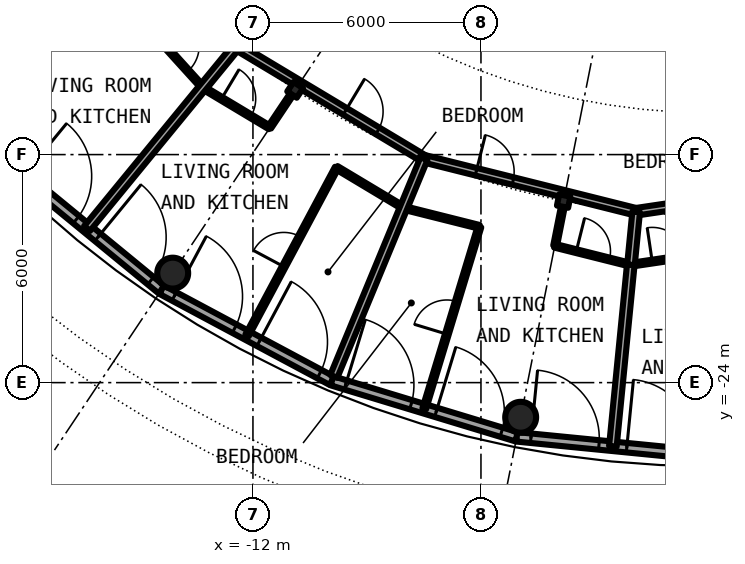
"""IFC4 building model, lengths in metres.
Left out: names, types, materials, properties, quantities, classifications, styles, units other than length and angle.
Written with IfcOpenShell. Run it as: python <this file> out.ifc"""

import sys

from ifc_helpers import new_model, si_unit, direction, frame, frame_2d, origin, origin_2d, place, context, subcontext, project, spatial, rectangle, hollow_circle, i_section, extrude, element, fill, save


model = new_model("IFC4")
c1 = context("Model", 3, precision=1e-05, world=origin(), true_north=direction((0.0, 1.0)))
c2 = subcontext(c1, "Body", "Model", "MODEL_VIEW")
j1 = project(units=[si_unit("LENGTHUNIT", "METRE"), si_unit("PLANEANGLEUNIT", "RADIAN")], contexts=[c1])
p1 = place(None, origin())
s1 = spatial("IfcSite", under=j1, at=p1, CompositionType="ELEMENT")
p2 = place(p1, origin())
s2 = spatial("IfcBuilding", under=s1, at=p2, CompositionType="ELEMENT")
p3 = place(p2, frame((0.0, 0.0, 237.1)))
s3 = spatial("IfcBuildingStorey", under=s2, at=p3, CompositionType="ELEMENT", Elevation=237.1)
for number, where, z_axis, x_axis in (
    (1, (-14.112, -21.119, 0.0), (0.0, 0.0, 1.0), (1.0, 0.0, 0.0)),
    (2, (-4.955, -24.912, 0.0), (0.0, 0.0, 1.0), (1.0, 0.0, 0.0)),
):
    element("IfcColumn", number, at=place(p3, frame(where, z_axis=z_axis, x_axis=x_axis)), inside=s3, PredefinedType="COLUMN", context=c2, shape_type="SweptSolid", body=[
        extrude(hollow_circle(Radius=0.406, WallThickness=0.03, at=origin_2d()), origin(), (0.0, 0.0, 1.0), 3.05),
    ])
for number, where, z_axis, x_axis in (
    (3, (-10.889, -16.297, 0.0), (0.0, 0.0, 1.0), (-0.556, -0.831, 0.0)),
    (4, (-3.824, -19.223, 0.0), (0.0, 0.0, 1.0), (-0.195, -0.981, 0.0)),
):
    element("IfcColumn", number, at=place(p3, frame(where, z_axis=z_axis, x_axis=x_axis)), inside=s3, PredefinedType="COLUMN", context=c2, shape_type="SweptSolid", body=[
        extrude(i_section(OverallWidth=0.3, OverallDepth=0.3, WebThickness=0.011, FlangeThickness=0.019, FilletRadius=0.027, at=origin_2d()), origin(), (0.0, 0.0, 1.0), 3.05),
    ])
p4 = place(p3, frame((-18.332, -18.332, 0.0), z_axis=(0.0, 0.0, 1.0), x_axis=(0.77306189429, -0.63433059803, 0.0)))
e5 = element("IfcWall", 5, at=p4, inside=s3, PredefinedType="SOLIDWALL", context=c2, shape_type="SweptSolid", body=[
    extrude(rectangle(XDim=5.082, YDim=0.25, at=frame_2d((2.541, 0.0))), origin(), (0.0, 0.0, 1.0), 2.7),
])
p5 = place(p4, frame((0.374, 0.0, 0.0)))
e6 = element("IfcOpeningElement", 6, at=p5, cuts=e5, PredefinedType="OPENING", context=c2, shape_type="SweptSolid", body=[
    extrude(rectangle(XDim=1.8, YDim=2.2, at=frame_2d((0.9, 1.1))), frame((0.0, 0.135, 0.0), z_axis=(0.0, -1.0, 0.0), x_axis=(1.0, 0.0, 0.0)), (0.0, 0.0, 1.0), 0.27),
])
p6 = place(p4, frame((2.909, 0.0, 0.0)))
e7 = element("IfcOpeningElement", 7, at=p6, cuts=e5, PredefinedType="OPENING", context=c2, shape_type="SweptSolid", body=[
    extrude(rectangle(XDim=1.8, YDim=2.2, at=frame_2d((0.9, 1.1))), frame((0.0, 0.135, 0.0), z_axis=(0.0, -1.0, 0.0), x_axis=(1.0, 0.0, 0.0)), (0.0, 0.0, 1.0), 0.27),
])
p7 = place(p3, frame((-14.403, -21.556, 0.0), z_axis=(0.0, 0.0, 1.0), x_axis=(0.881903089468, -0.47143073806, 0.0)))
e8 = element("IfcWall", 8, at=p7, inside=s3, PredefinedType="SOLIDWALL", context=c2, shape_type="SweptSolid", body=[
    extrude(rectangle(XDim=5.082, YDim=0.25, at=frame_2d((2.541, 0.0))), origin(), (0.0, 0.0, 1.0), 2.7),
])
p8 = place(p7, frame((0.374, 0.0, 0.0)))
e9 = element("IfcOpeningElement", 9, at=p8, cuts=e8, PredefinedType="OPENING", context=c2, shape_type="SweptSolid", body=[
    extrude(rectangle(XDim=1.8, YDim=2.2, at=frame_2d((0.9, 1.1))), frame((0.0, 0.135, 0.0), z_axis=(0.0, -1.0, 0.0), x_axis=(1.0, 0.0, 0.0)), (0.0, 0.0, 1.0), 0.27),
])
p9 = place(p7, frame((2.909, 0.0, 0.0)))
e10 = element("IfcOpeningElement", 10, at=p9, cuts=e8, PredefinedType="OPENING", context=c2, shape_type="SweptSolid", body=[
    extrude(rectangle(XDim=1.8, YDim=2.2, at=frame_2d((0.9, 1.1))), frame((0.0, 0.135, 0.0), z_axis=(0.0, -1.0, 0.0), x_axis=(1.0, 0.0, 0.0)), (0.0, 0.0, 1.0), 0.27),
])
p10 = place(p3, frame((-9.921, -23.952, 0.0), z_axis=(0.0, 0.0, 1.0), x_axis=(0.956941126395, -0.290282070774, 0.0)))
e11 = element("IfcWall", 11, at=p10, inside=s3, PredefinedType="SOLIDWALL", context=c2, shape_type="SweptSolid", body=[
    extrude(rectangle(XDim=5.082, YDim=0.25, at=frame_2d((2.541, 0.0))), origin(), (0.0, 0.0, 1.0), 2.7),
])
p11 = place(p10, frame((0.374, 0.0, 0.0)))
e12 = element("IfcOpeningElement", 12, at=p11, cuts=e11, PredefinedType="OPENING", context=c2, shape_type="SweptSolid", body=[
    extrude(rectangle(XDim=1.8, YDim=2.2, at=frame_2d((0.9, 1.1))), frame((0.0, 0.135, 0.0), z_axis=(0.0, -1.0, 0.0), x_axis=(1.0, 0.0, 0.0)), (0.0, 0.0, 1.0), 0.27),
])
p12 = place(p10, frame((2.861, 0.0, 0.0)))
e13 = element("IfcOpeningElement", 13, at=p12, cuts=e11, PredefinedType="OPENING", context=c2, shape_type="SweptSolid", body=[
    extrude(rectangle(XDim=1.8, YDim=2.2, at=frame_2d((0.9, 1.1))), frame((0.0, 0.135, 0.0), z_axis=(0.0, -1.0, 0.0), x_axis=(1.0, 0.0, 0.0)), (0.0, 0.0, 1.0), 0.27),
])
p13 = place(p3, frame((-5.058, -25.427, 0.0), z_axis=(0.0, 0.0, 1.0), x_axis=(0.995187279479, -0.097991217788, 0.0)))
e14 = element("IfcWall", 14, at=p13, inside=s3, PredefinedType="SOLIDWALL", context=c2, shape_type="SweptSolid", body=[
    extrude(rectangle(XDim=5.083, YDim=0.25, at=frame_2d((2.541, 0.0))), origin(), (0.0, 0.0, 1.0), 2.7),
])
p14 = place(p13, frame((0.374, 0.0, 0.0)))
e15 = element("IfcOpeningElement", 15, at=p14, cuts=e14, PredefinedType="OPENING", context=c2, shape_type="SweptSolid", body=[
    extrude(rectangle(XDim=1.8, YDim=2.2, at=frame_2d((0.9, 1.1))), frame((0.0, 0.135, 0.0), z_axis=(0.0, -1.0, 0.0), x_axis=(1.0, 0.0, 0.0)), (0.0, 0.0, 1.0), 0.27),
])
p15 = place(p13, frame((2.909, 0.0, 0.0)))
e16 = element("IfcOpeningElement", 16, at=p15, cuts=e14, PredefinedType="OPENING", context=c2, shape_type="SweptSolid", body=[
    extrude(rectangle(XDim=1.8, YDim=2.2, at=frame_2d((0.9, 1.1))), frame((0.0, 0.135, 0.0), z_axis=(0.0, -1.0, 0.0), x_axis=(1.0, 0.0, 0.0)), (0.0, 0.0, 1.0), 0.27),
])
p16 = place(p3, frame((-14.702, -14.711, 0.0), z_axis=(0.0, 0.0, 1.0), x_axis=(0.671678456097, -0.74084279818, 0.0)))
e17 = element("IfcWall", 17, at=p16, inside=s3, PredefinedType="PARTITIONING", context=c2, shape_type="SweptSolid", body=[
    extrude(rectangle(XDim=2.054, YDim=0.1, at=frame_2d((1.027, 0.0))), origin(), (0.0, 0.0, 1.0), 2.7),
])
p17 = place(p16, frame((0.577, 0.0, 0.0)))
e18 = element("IfcOpeningElement", 18, at=p17, cuts=e17, PredefinedType="OPENING", context=c2, shape_type="SweptSolid", body=[
    extrude(rectangle(XDim=0.9, YDim=2.3, at=frame_2d((0.45, 1.15))), frame((0.0, 0.06, 0.0), z_axis=(0.0, -1.0, 0.0), x_axis=(1.0, 0.0, 0.0)), (0.0, 0.0, 1.0), 0.12),
])
p18 = place(p3, frame((-13.322, -16.233, 0.0), z_axis=(0.0, 0.0, 1.0), x_axis=(0.857713062192, -0.514128683254, 0.0)))
e19 = element("IfcWall", 19, at=p18, inside=s3, PredefinedType="PARTITIONING", context=c2, shape_type="SweptSolid", body=[
    extrude(rectangle(XDim=2.054, YDim=0.1, at=frame_2d((1.027, 0.0))), origin(), (0.0, 0.0, 1.0), 2.7),
])
p19 = place(p18, frame((0.577, 0.0, 0.0)))
e20 = element("IfcOpeningElement", 20, at=p19, cuts=e19, PredefinedType="OPENING", context=c2, shape_type="SweptSolid", body=[
    extrude(rectangle(XDim=0.9, YDim=2.3, at=frame_2d((0.45, 1.15))), frame((0.0, 0.06, 0.0), z_axis=(0.0, -1.0, 0.0), x_axis=(1.0, 0.0, 0.0)), (0.0, 0.0, 1.0), 0.12),
])
p20 = place(p3, frame((-9.798, -18.345, 0.0), z_axis=(0.0, 0.0, 1.0), x_axis=(0.857796869978, -0.513988842152, 0.0)))
e21 = element("IfcWall", 21, at=p20, inside=s3, PredefinedType="PARTITIONING", context=c2, shape_type="SweptSolid", body=[
    extrude(rectangle(XDim=2.054, YDim=0.1, at=frame_2d((1.027, 0.0))), origin(), (0.0, 0.0, 1.0), 2.7),
])
p21 = place(p3, frame((-8.036, -19.401, 0.0), z_axis=(0.0, 0.0, 1.0), x_axis=(0.96991130126, -0.243458554355, 0.0)))
e22 = element("IfcWall", 22, at=p21, inside=s3, PredefinedType="PARTITIONING", context=c2, shape_type="SweptSolid", body=[
    extrude(rectangle(XDim=2.054, YDim=0.1, at=frame_2d((1.027, 0.0))), origin(), (0.0, 0.0, 1.0), 2.7),
])
p22 = place(p3, frame((-4.063, -20.398, 0.0), z_axis=(0.0, 0.0, 1.0), x_axis=(0.969939465938, -0.24334632197, 0.0)))
e23 = element("IfcWall", 23, at=p22, inside=s3, PredefinedType="PARTITIONING", context=c2, shape_type="SweptSolid", body=[
    extrude(rectangle(XDim=2.055, YDim=0.1, at=frame_2d((1.027, 0.0))), origin(), (0.0, 0.0, 1.0), 2.7),
])
p23 = place(p22, frame((0.589, 0.0, 0.0)))
e24 = element("IfcOpeningElement", 24, at=p23, cuts=e23, PredefinedType="OPENING", context=c2, shape_type="SweptSolid", body=[
    extrude(rectangle(XDim=0.9, YDim=2.3, at=frame_2d((0.45, 1.15))), frame((0.0, 0.06, 0.0), z_axis=(0.0, -1.0, 0.0), x_axis=(1.0, 0.0, 0.0)), (0.0, 0.0, 1.0), 0.12),
])
p24 = place(p3, frame((-2.061, -20.9, 0.0), z_axis=(0.0, 0.0, 1.0), x_axis=(0.989154601185, 0.146878095557, 0.0)))
e25 = element("IfcWall", 25, at=p24, inside=s3, PredefinedType="PARTITIONING", context=c2, shape_type="SweptSolid", body=[
    extrude(rectangle(XDim=2.041, YDim=0.1, at=frame_2d((1.021, 0.0))), origin(), (0.0, 0.0, 1.0), 2.7),
])
p25 = place(p24, frame((0.574, 0.0, 0.0)))
e26 = element("IfcOpeningElement", 26, at=p25, cuts=e25, PredefinedType="OPENING", context=c2, shape_type="SweptSolid", body=[
    extrude(rectangle(XDim=0.9, YDim=2.3, at=frame_2d((0.45, 1.15))), frame((0.0, 0.06, 0.0), z_axis=(0.0, -1.0, 0.0), x_axis=(1.0, 0.0, 0.0)), (0.0, 0.0, 1.0), 0.12),
])
p26 = place(p3, frame((-12.434, -15.151, 0.0), z_axis=(0.0, 0.0, 1.0), x_axis=(0.857710084627, -0.514133650648, 0.0)))
e27 = element("IfcWall", 27, at=p26, inside=s3, PredefinedType="PARTITIONING", context=c2, shape_type="SweptSolid", body=[
    extrude(rectangle(XDim=5.751, YDim=0.2, at=frame_2d((2.876, 0.0))), origin(), (0.0, 0.0, 1.0), 2.45),
])
p27 = place(p26, frame((3.333, 0.0, 0.0)))
e28 = element("IfcOpeningElement", 28, at=p27, cuts=e27, PredefinedType="OPENING", context=c2, shape_type="SweptSolid", body=[
    extrude(rectangle(XDim=1.0, YDim=2.3, at=frame_2d((0.5, 1.15))), frame((0.0, 0.11, 0.0), z_axis=(0.0, -1.0, 0.0), x_axis=(1.0, 0.0, 0.0)), (0.0, 0.0, 1.0), 0.22),
])
p28 = place(p3, frame((-7.501, -18.108, 0.0), z_axis=(0.0, 0.0, 1.0), x_axis=(0.970012544183, -0.243054858266, 0.0)))
e29 = element("IfcWall", 29, at=p28, inside=s3, PredefinedType="PARTITIONING", context=c2, shape_type="SweptSolid", body=[
    extrude(rectangle(XDim=5.753, YDim=0.2, at=frame_2d((2.876, 0.0))), origin(), (0.0, 0.0, 1.0), 2.45),
])
p29 = place(p28, frame((1.417, 0.0, 0.0)))
e30 = element("IfcOpeningElement", 30, at=p29, cuts=e29, PredefinedType="OPENING", context=c2, shape_type="SweptSolid", body=[
    extrude(rectangle(XDim=1.0, YDim=2.3, at=frame_2d((0.5, 1.15))), frame((0.0, 0.11, 0.0), z_axis=(0.0, -1.0, 0.0), x_axis=(1.0, 0.0, 0.0)), (0.0, 0.0, 1.0), 0.22),
])
p30 = place(p3, frame((-1.927, -19.506, 0.0), z_axis=(0.0, 0.0, 1.0), x_axis=(0.989181308547, 0.146698121399, 0.0)))
e31 = element("IfcWall", 31, at=p30, inside=s3, PredefinedType="PARTITIONING", context=c2, shape_type="SweptSolid", body=[
    extrude(rectangle(XDim=9.531, YDim=0.2, at=frame_2d((4.766, 0.0))), origin(), (0.0, 0.0, 1.0), 2.45),
])
p31 = place(p30, frame((5.811, 0.0, 0.0)))
e32 = element("IfcOpeningElement", 32, at=p31, cuts=e31, PredefinedType="OPENING", context=c2, shape_type="SweptSolid", body=[
    extrude(rectangle(XDim=1.0, YDim=2.3, at=frame_2d((0.5, 1.15))), frame((0.0, 0.11, 0.0), z_axis=(0.0, -1.0, 0.0), x_axis=(1.0, 0.0, 0.0)), (0.0, 0.0, 1.0), 0.22),
])
p32 = place(p3, frame((-19.949, -16.361, 0.0), z_axis=(0.0, 0.0, 1.0), x_axis=(0.773226150619, 0.634130365145, 0.0)))
e33 = element("IfcWall", 33, at=p32, inside=s3, PredefinedType="PARTITIONING", context=c2, shape_type="SweptSolid", body=[
    extrude(rectangle(XDim=5.002, YDim=0.1, at=frame_2d((2.501, 0.0))), origin(), (0.0, 0.0, 1.0), 2.7),
])
p33 = place(p32, frame((2.051, 0.0, 0.0)))
e34 = element("IfcOpeningElement", 34, at=p33, cuts=e33, PredefinedType="OPENING", context=c2, shape_type="SweptSolid", body=[
    extrude(rectangle(XDim=0.9, YDim=2.3, at=frame_2d((0.45, 1.15))), frame((0.0, 0.06, 0.0), z_axis=(0.0, -1.0, 0.0), x_axis=(1.0, 0.0, 0.0)), (0.0, 0.0, 1.0), 0.12),
])
p34 = place(p3, frame((-16.366, -19.945, 0.0), z_axis=(0.0, 0.0, 1.0), x_axis=(0.634332904094, 0.773060002059, 0.0)))
e35 = element("IfcWall", 35, at=p34, inside=s3, PredefinedType="PARTITIONING", context=c2, shape_type="SweptSolid", body=[
    extrude(rectangle(XDim=6.2, YDim=0.2, at=frame_2d((3.1, 0.0))), origin(), (0.0, 0.0, 1.0), 2.7),
])
p35 = place(p3, frame((-12.155, -22.757, 0.0), z_axis=(0.0, 0.0, 1.0), x_axis=(0.4711809038, 0.882036595553, 0.0)))
e36 = element("IfcWall", 36, at=p35, inside=s3, PredefinedType="PARTITIONING", context=c2, shape_type="SweptSolid", body=[
    extrude(rectangle(XDim=5.002, YDim=0.1, at=frame_2d((2.501, 0.0))), origin(), (0.0, 0.0, 1.0), 2.7),
])
p36 = place(p35, frame((2.051, 0.0, 0.0)))
e37 = element("IfcOpeningElement", 37, at=p36, cuts=e36, PredefinedType="OPENING", context=c2, shape_type="SweptSolid", body=[
    extrude(rectangle(XDim=0.9, YDim=2.3, at=frame_2d((0.45, 1.15))), frame((0.0, 0.06, 0.0), z_axis=(0.0, -1.0, 0.0), x_axis=(1.0, 0.0, 0.0)), (0.0, 0.0, 1.0), 0.12),
])
p37 = place(p3, frame((-11.565, -17.286, 0.0), z_axis=(0.0, 0.0, 1.0), x_axis=(0.556311964259, 0.830973524502, 0.0)))
e38 = element("IfcWall", 38, at=p37, inside=s3, PredefinedType="PARTITIONING", context=c2, shape_type="SweptSolid", body=[
    extrude(rectangle(XDim=1.048, YDim=0.1, at=frame_2d((0.524, 0.0))), origin(), (0.0, 0.0, 1.0), 2.7),
])
p38 = place(p3, frame((-9.873, -23.836, 0.0), z_axis=(0.0, 0.0, 1.0), x_axis=(0.382606842458, 0.92391125337, 0.0)))
e39 = element("IfcWall", 39, at=p38, inside=s3, PredefinedType="PARTITIONING", context=c2, shape_type="SweptSolid", body=[
    extrude(rectangle(XDim=6.2, YDim=0.2, at=frame_2d((3.1, 0.0))), origin(), (0.0, 0.0, 1.0), 2.7),
])
p39 = place(p3, frame((-7.493, -24.688, 0.0), z_axis=(0.0, 0.0, 1.0), x_axis=(0.290485594165, 0.956879365219, 0.0)))
e40 = element("IfcWall", 40, at=p39, inside=s3, PredefinedType="PARTITIONING", context=c2, shape_type="SweptSolid", body=[
    extrude(rectangle(XDim=5.001, YDim=0.1, at=frame_2d((2.501, 0.0))), origin(), (0.0, 0.0, 1.0), 2.7),
])
p40 = place(p39, frame((2.051, 0.0, 0.0)))
e41 = element("IfcOpeningElement", 41, at=p40, cuts=e40, PredefinedType="OPENING", context=c2, shape_type="SweptSolid", body=[
    extrude(rectangle(XDim=0.9, YDim=2.3, at=frame_2d((0.45, 1.15))), frame((0.0, 0.06, 0.0), z_axis=(0.0, -1.0, 0.0), x_axis=(1.0, 0.0, 0.0)), (0.0, 0.0, 1.0), 0.12),
])
p41 = place(p3, frame((-4.049, -20.4, 0.0), z_axis=(0.0, 0.0, 1.0), x_axis=(0.194771831703, 0.980848578311, 0.0)))
e42 = element("IfcWall", 42, at=p41, inside=s3, PredefinedType="PARTITIONING", context=c2, shape_type="SweptSolid", body=[
    extrude(rectangle(XDim=1.048, YDim=0.1, at=frame_2d((0.524, 0.0))), origin(), (0.0, 0.0, 1.0), 2.7),
])
p42 = place(p3, frame((-2.529, -25.676, 0.0), z_axis=(0.0, 0.0, 1.0), x_axis=(0.098108750677, 0.995175699583, 0.0)))
e43 = element("IfcWall", 43, at=p42, inside=s3, PredefinedType="PARTITIONING", context=c2, shape_type="SweptSolid", body=[
    extrude(rectangle(XDim=4.8, YDim=0.2, at=frame_2d((2.4, 0.0))), origin(), (0.0, 0.0, 1.0), 2.7),
])
p43 = place(p3, frame((-2.053, -20.9, 0.0), z_axis=(0.0, 0.0, 1.0), x_axis=(0.097862778951, 0.995199917854, 0.0)))
e44 = element("IfcWall", 44, at=p43, inside=s3, PredefinedType="PARTITIONING", context=c2, shape_type="SweptSolid", body=[
    extrude(rectangle(XDim=1.4, YDim=0.2, at=frame_2d((0.7, 0.0))), origin(), (0.0, 0.0, 1.0), 2.7),
])
p44 = place(p5, origin())
e45 = element("IfcDoor", 45, at=p44, inside=s3, OperationType="SINGLE_SWING_LEFT", PredefinedType="DOOR", context=c2, shape_type="SweptSolid", body=[
    extrude(rectangle(XDim=1.8, YDim=2.2, at=frame_2d((0.9, 1.1))), frame((0.0, 0.025, 0.0), z_axis=(0.0, -1.0, 0.0), x_axis=(1.0, 0.0, 0.0)), (0.0, 0.0, 1.0), 0.05),
])
fill(e6, e45)
p45 = place(p6, origin())
e46 = element("IfcDoor", 46, at=p45, inside=s3, OperationType="SINGLE_SWING_LEFT", PredefinedType="DOOR", context=c2, shape_type="SweptSolid", body=[
    extrude(rectangle(XDim=1.8, YDim=2.2, at=frame_2d((0.9, 1.1))), frame((0.0, 0.025, 0.0), z_axis=(0.0, -1.0, 0.0), x_axis=(1.0, 0.0, 0.0)), (0.0, 0.0, 1.0), 0.05),
])
fill(e7, e46)
p46 = place(p8, origin())
e47 = element("IfcDoor", 47, at=p46, inside=s3, OperationType="SINGLE_SWING_LEFT", PredefinedType="DOOR", context=c2, shape_type="SweptSolid", body=[
    extrude(rectangle(XDim=1.8, YDim=2.2, at=frame_2d((0.9, 1.1))), frame((0.0, 0.025, 0.0), z_axis=(0.0, -1.0, 0.0), x_axis=(1.0, 0.0, 0.0)), (0.0, 0.0, 1.0), 0.05),
])
fill(e9, e47)
p47 = place(p9, origin())
e48 = element("IfcDoor", 48, at=p47, inside=s3, OperationType="SINGLE_SWING_LEFT", PredefinedType="DOOR", context=c2, shape_type="SweptSolid", body=[
    extrude(rectangle(XDim=1.8, YDim=2.2, at=frame_2d((0.9, 1.1))), frame((0.0, 0.025, 0.0), z_axis=(0.0, -1.0, 0.0), x_axis=(1.0, 0.0, 0.0)), (0.0, 0.0, 1.0), 0.05),
])
fill(e10, e48)
p48 = place(p11, origin())
e49 = element("IfcDoor", 49, at=p48, inside=s3, OperationType="SINGLE_SWING_LEFT", PredefinedType="DOOR", context=c2, shape_type="SweptSolid", body=[
    extrude(rectangle(XDim=1.8, YDim=2.2, at=frame_2d((0.9, 1.1))), frame((0.0, 0.025, 0.0), z_axis=(0.0, -1.0, 0.0), x_axis=(1.0, 0.0, 0.0)), (0.0, 0.0, 1.0), 0.05),
])
fill(e12, e49)
p49 = place(p12, origin())
e50 = element("IfcDoor", 50, at=p49, inside=s3, OperationType="SINGLE_SWING_LEFT", PredefinedType="DOOR", context=c2, shape_type="SweptSolid", body=[
    extrude(rectangle(XDim=1.8, YDim=2.2, at=frame_2d((0.9, 1.1))), frame((0.0, 0.025, 0.0), z_axis=(0.0, -1.0, 0.0), x_axis=(1.0, 0.0, 0.0)), (0.0, 0.0, 1.0), 0.05),
])
fill(e13, e50)
p50 = place(p14, origin())
e51 = element("IfcDoor", 51, at=p50, inside=s3, OperationType="SINGLE_SWING_LEFT", PredefinedType="DOOR", context=c2, shape_type="SweptSolid", body=[
    extrude(rectangle(XDim=1.8, YDim=2.2, at=frame_2d((0.9, 1.1))), frame((0.0, 0.025, 0.0), z_axis=(0.0, -1.0, 0.0), x_axis=(1.0, 0.0, 0.0)), (0.0, 0.0, 1.0), 0.05),
])
fill(e15, e51)
p51 = place(p15, origin())
e52 = element("IfcDoor", 52, at=p51, inside=s3, OperationType="SINGLE_SWING_LEFT", PredefinedType="DOOR", context=c2, shape_type="SweptSolid", body=[
    extrude(rectangle(XDim=1.8, YDim=2.2, at=frame_2d((0.9, 1.1))), frame((0.0, 0.025, 0.0), z_axis=(0.0, -1.0, 0.0), x_axis=(1.0, 0.0, 0.0)), (0.0, 0.0, 1.0), 0.05),
])
fill(e16, e52)
p52 = place(p17, origin())
e53 = element("IfcDoor", 53, at=p52, inside=s3, OperationType="SINGLE_SWING_RIGHT", PredefinedType="DOOR", context=c2, shape_type="SweptSolid", body=[
    extrude(rectangle(XDim=0.9, YDim=2.3, at=frame_2d((0.45, 1.15))), frame((0.0, 0.025, 0.0), z_axis=(0.0, -1.0, 0.0), x_axis=(1.0, 0.0, 0.0)), (0.0, 0.0, 1.0), 0.05),
])
fill(e18, e53)
p53 = place(p27, origin())
e54 = element("IfcDoor", 54, at=p53, inside=s3, OperationType="SINGLE_SWING_RIGHT", PredefinedType="DOOR", context=c2, shape_type="SweptSolid", body=[
    extrude(rectangle(XDim=1.0, YDim=2.3, at=frame_2d((0.5, 1.15))), frame((0.0, 0.025, 0.0), z_axis=(0.0, -1.0, 0.0), x_axis=(1.0, 0.0, 0.0)), (0.0, 0.0, 1.0), 0.05),
])
fill(e28, e54)
p54 = place(p19, origin())
e55 = element("IfcDoor", 55, at=p54, inside=s3, OperationType="SINGLE_SWING_RIGHT", PredefinedType="DOOR", context=c2, shape_type="SweptSolid", body=[
    extrude(rectangle(XDim=0.9, YDim=2.3, at=frame_2d((0.45, 1.15))), frame((0.0, 0.025, 0.0), z_axis=(0.0, -1.0, 0.0), x_axis=(1.0, 0.0, 0.0)), (0.0, 0.0, 1.0), 0.05),
])
fill(e20, e55)
p55 = place(p36, origin())
e56 = element("IfcDoor", 56, at=p55, inside=s3, OperationType="SINGLE_SWING_RIGHT", PredefinedType="DOOR", context=c2, shape_type="SweptSolid", body=[
    extrude(rectangle(XDim=0.9, YDim=2.3, at=frame_2d((0.45, 1.15))), frame((0.0, 0.025, 0.0), z_axis=(0.0, -1.0, 0.0), x_axis=(1.0, 0.0, 0.0)), (0.0, 0.0, 1.0), 0.05),
])
fill(e37, e56)
p56 = place(p29, origin())
e57 = element("IfcDoor", 57, at=p56, inside=s3, OperationType="SINGLE_SWING_LEFT", PredefinedType="DOOR", context=c2, shape_type="SweptSolid", body=[
    extrude(rectangle(XDim=1.0, YDim=2.3, at=frame_2d((0.5, 1.15))), frame((0.0, 0.025, 0.0), z_axis=(0.0, -1.0, 0.0), x_axis=(1.0, 0.0, 0.0)), (0.0, 0.0, 1.0), 0.05),
])
fill(e30, e57)
p57 = place(p23, origin())
e58 = element("IfcDoor", 58, at=p57, inside=s3, OperationType="SINGLE_SWING_RIGHT", PredefinedType="DOOR", context=c2, shape_type="SweptSolid", body=[
    extrude(rectangle(XDim=0.9, YDim=2.3, at=frame_2d((0.45, 1.15))), frame((0.0, 0.025, 0.0), z_axis=(0.0, -1.0, 0.0), x_axis=(1.0, 0.0, 0.0)), (0.0, 0.0, 1.0), 0.05),
])
fill(e24, e58)
p58 = place(p40, origin())
e59 = element("IfcDoor", 59, at=p58, inside=s3, OperationType="SINGLE_SWING_LEFT", PredefinedType="DOOR", context=c2, shape_type="SweptSolid", body=[
    extrude(rectangle(XDim=0.9, YDim=2.3, at=frame_2d((0.45, 1.15))), frame((0.0, 0.025, 0.0), z_axis=(0.0, -1.0, 0.0), x_axis=(1.0, 0.0, 0.0)), (0.0, 0.0, 1.0), 0.05),
])
fill(e41, e59)
p59 = place(p25, origin())
e60 = element("IfcDoor", 60, at=p59, inside=s3, OperationType="SINGLE_SWING_RIGHT", PredefinedType="DOOR", context=c2, shape_type="SweptSolid", body=[
    extrude(rectangle(XDim=0.9, YDim=2.3, at=frame_2d((0.45, 1.15))), frame((0.0, 0.025, 0.0), z_axis=(0.0, -1.0, 0.0), x_axis=(1.0, 0.0, 0.0)), (0.0, 0.0, 1.0), 0.05),
])
fill(e26, e60)
save(model, sys.argv[1])
